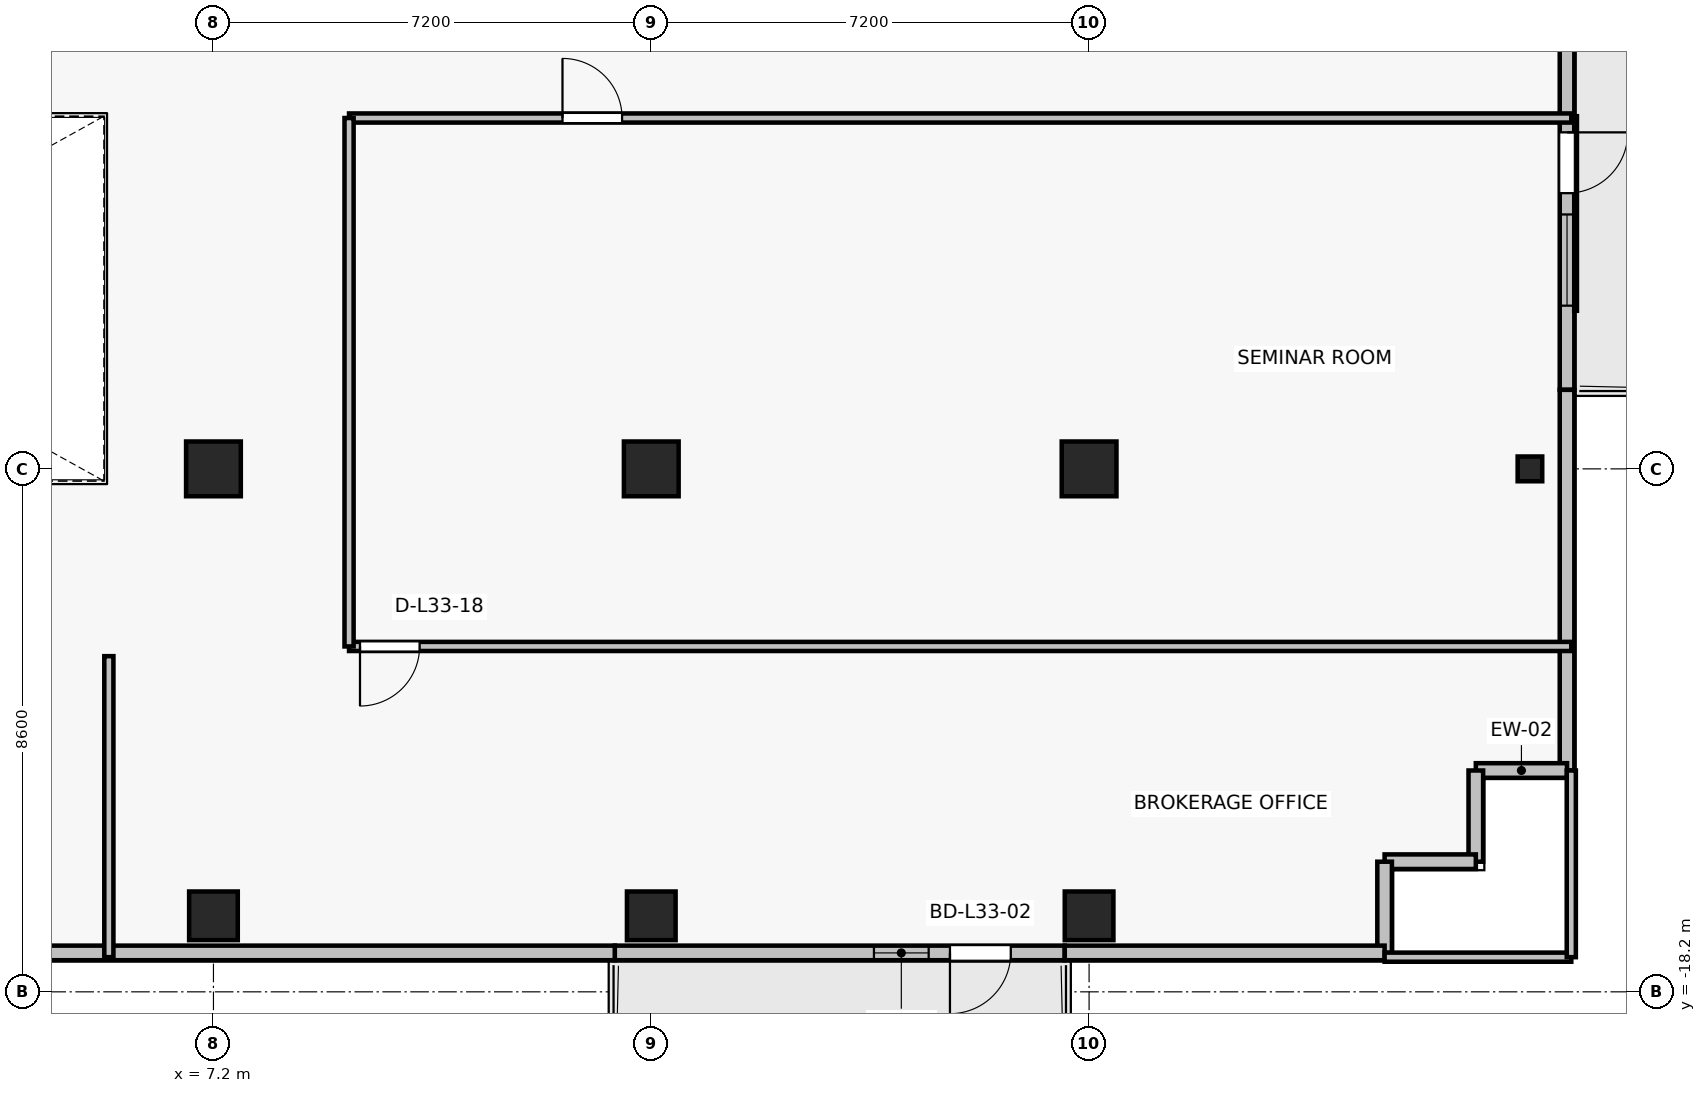
"""IFC4 building model, lengths in metres.
Left out: names, types, materials, properties, quantities, classifications, styles, units other than length and angle.
Written with IfcOpenShell. Run it as: python <this file> out.ifc"""

import sys

from ifc_helpers import new_model, si_unit, direction, frame, frame_2d, origin, origin_2d, place, context, subcontext, project, spatial, rectangle, i_section, extrude, source, transform, mapped, element, fill, save


model = new_model("IFC4")
c1 = context("Model", 3, precision=1e-05, world=origin(), true_north=direction((0.0, 1.0)))
c2 = subcontext(c1, "Body", "Model", "MODEL_VIEW")
j1 = project(units=[si_unit("LENGTHUNIT", "METRE"), si_unit("PLANEANGLEUNIT", "RADIAN")], contexts=[c1])
p1 = place(None, origin())
s1 = spatial("IfcSite", under=j1, at=p1, CompositionType="ELEMENT")
p2 = place(p1, origin())
s2 = spatial("IfcBuilding", under=s1, at=p2, CompositionType="ELEMENT")
p3 = place(p2, frame((0.0, 0.0, 119.8)))
s3 = spatial("IfcBuildingStorey", under=s2, at=p3, CompositionType="ELEMENT", Elevation=119.8)
for number, where, z_axis, x_axis in (
    (1, (7.2, -9.6, 0.0), (0.0, 0.0, 1.0), (1.0, 0.0, 0.0)),
    (2, (14.4, -9.6, 0.0), (0.0, 0.0, 1.0), (1.0, 0.0, 0.0)),
    (3, (21.6, -9.6, 0.0), (0.0, 0.0, 1.0), (1.0, 0.0, 0.0)),
):
    element("IfcColumn", number, at=place(p3, frame(where, z_axis=z_axis, x_axis=x_axis)), inside=s3, PredefinedType="COLUMN", context=c2, shape_type="SweptSolid", body=[
        extrude(rectangle(XDim=0.9, YDim=0.9, at=origin_2d()), origin(), (0.0, 0.0, 1.0), 3.3),
    ])
for number, where, z_axis, x_axis in (
    (4, (7.2, -16.95, 0.0), (0.0, 0.0, 1.0), (1.0, 0.0, 0.0)),
    (5, (14.4, -16.95, 0.0), (0.0, 0.0, 1.0), (1.0, 0.0, 0.0)),
    (6, (21.6, -16.95, 0.0), (0.0, 0.0, 1.0), (1.0, 0.0, 0.0)),
):
    element("IfcColumn", number, at=place(p3, frame(where, z_axis=z_axis, x_axis=x_axis)), inside=s3, PredefinedType="COLUMN", context=c2, shape_type="SweptSolid", body=[
        extrude(rectangle(XDim=0.8, YDim=0.8, at=origin_2d()), origin(), (0.0, 0.0, 1.0), 3.3),
    ])
p4 = place(p3, frame((28.85, -9.6, 0.0), z_axis=(0.0, 0.0, 1.0), x_axis=(1.0, 0.0, 0.0)))
e7 = element("IfcColumn", 7, at=p4, inside=s3, PredefinedType="COLUMN", context=c2, shape_type="SweptSolid", body=[
    extrude(i_section(OverallWidth=0.404, OverallDepth=0.407, WebThickness=0.022, FlangeThickness=0.032, FilletRadius=0.015, at=origin_2d()), origin(), (0.0, 0.0, 1.0), 3.3),
])
p5 = place(p3, frame((21.2, -17.56, 0.0), z_axis=(0.0, 0.0, 1.0), x_axis=(-1.0, 0.0, 0.0)))
e8 = element("IfcWall", 8, at=p5, inside=s3, PredefinedType="SOLIDWALL", context=c2, shape_type="SweptSolid", body=[
    extrude(rectangle(XDim=7.4, YDim=0.24, at=frame_2d((3.7, 0.0))), origin(), (0.0, 0.0, 1.0), 2.665),
])
p6 = place(p5, frame((0.888, 0.0, 0.0)))
e9 = element("IfcOpeningElement", 9, at=p6, cuts=e8, PredefinedType="OPENING", context=c2, shape_type="SweptSolid", body=[
    extrude(rectangle(XDim=1.0, YDim=2.2, at=frame_2d((0.5, 1.1))), frame((0.0, 0.13, 0.0), z_axis=(0.0, -1.0, 0.0), x_axis=(1.0, 0.0, 0.0)), (0.0, 0.0, 1.0), 0.26),
])
p7 = place(p5, frame((2.238, 0.0, 0.85)))
e10 = element("IfcOpeningElement", 10, at=p7, cuts=e8, PredefinedType="OPENING", context=c2, shape_type="SweptSolid", body=[
    extrude(rectangle(XDim=0.9, YDim=1.35, at=frame_2d((0.45, 0.675))), frame((0.0, 0.13, 0.0), z_axis=(0.0, -1.0, 0.0), x_axis=(1.0, 0.0, 0.0)), (0.0, 0.0, 1.0), 0.26),
])
p8 = place(p3, frame((29.46, -2.5, 0.0), z_axis=(0.0, 0.0, 1.0), x_axis=(0.0, -1.0, 0.0)))
e11 = element("IfcWall", 11, at=p8, inside=s3, PredefinedType="SOLIDWALL", context=c2, shape_type="SweptSolid", body=[
    extrude(rectangle(XDim=5.8, YDim=0.24, at=frame_2d((2.9, 0.0))), origin(), (0.0, 0.0, 1.0), 3.075),
])
p9 = place(p8, frame((1.566, 0.0, 0.0)))
e12 = element("IfcOpeningElement", 12, at=p9, cuts=e11, PredefinedType="OPENING", context=c2, shape_type="SweptSolid", body=[
    extrude(rectangle(XDim=1.0, YDim=2.2, at=frame_2d((0.5, 1.1))), frame((0.0, 0.13, 0.0), z_axis=(0.0, -1.0, 0.0), x_axis=(1.0, 0.0, 0.0)), (0.0, 0.0, 1.0), 0.26),
])
p10 = place(p8, frame((2.916, 0.0, 0.85)))
e13 = element("IfcOpeningElement", 13, at=p10, cuts=e11, PredefinedType="OPENING", context=c2, shape_type="SweptSolid", body=[
    extrude(rectangle(XDim=1.5, YDim=1.6, at=frame_2d((0.75, 0.8))), frame((0.0, 0.13, 0.0), z_axis=(0.0, -1.0, 0.0), x_axis=(1.0, 0.0, 0.0)), (0.0, 0.0, 1.0), 0.26),
])
p11 = place(p3, frame((29.46, -14.56, 0.0), z_axis=(0.0, 0.0, 1.0), x_axis=(0.0, 1.0, 0.0)))
e14 = element("IfcWall", 14, at=p11, inside=s3, PredefinedType="SOLIDWALL", context=c2, shape_type="SweptSolid", body=[
    extrude(rectangle(XDim=6.26, YDim=0.24, at=frame_2d((3.13, 0.0))), origin(), (0.0, 0.0, 1.0), 3.075),
])
for number, where, z_axis, x_axis in (
    (15, (27.96, -14.56, 0.0), (0.0, 0.0, 1.0), (1.0, 0.0, 0.0)),
    (16, (27.96, -16.06, 0.0), (0.0, 0.0, 1.0), (0.0, 1.0, 0.0)),
    (17, (26.46, -16.06, 0.0), (0.0, 0.0, 1.0), (1.0, 0.0, 0.0)),
    (18, (26.46, -17.56, 0.0), (0.0, 0.0, 1.0), (0.0, 1.0, 0.0)),
):
    element("IfcWall", number, at=place(p3, frame(where, z_axis=z_axis, x_axis=x_axis)), inside=s3, PredefinedType="SOLIDWALL", context=c2, shape_type="SweptSolid", body=[
        extrude(rectangle(XDim=1.5, YDim=0.24, at=frame_2d((0.75, 0.0))), origin(), (0.0, 0.0, 1.0), 3.075),
    ])
p12 = place(p3, frame((21.2, -17.56, 0.0), z_axis=(0.0, 0.0, 1.0), x_axis=(1.0, 0.0, 0.0)))
e19 = element("IfcWall", 19, at=p12, inside=s3, PredefinedType="SOLIDWALL", context=c2, shape_type="SweptSolid", body=[
    extrude(rectangle(XDim=5.26, YDim=0.24, at=frame_2d((2.63, 0.0))), origin(), (0.0, 0.0, 1.0), 3.075),
])
p13 = place(p3, frame((3.34, -17.56, 0.0), z_axis=(0.0, 0.0, 1.0), x_axis=(1.0, 0.0, 0.0)))
e20 = element("IfcWall", 20, at=p13, inside=s3, PredefinedType="SOLIDWALL", context=c2, shape_type="SweptSolid", body=[
    extrude(rectangle(XDim=10.46, YDim=0.24, at=frame_2d((5.23, 0.0))), origin(), (0.0, 0.0, 1.0), 2.665),
])
p14 = place(p3, frame((29.53, -12.52, 0.0), z_axis=(0.0, 0.0, 1.0), x_axis=(-1.0, 0.0, 0.0)))
e21 = element("IfcWall", 21, at=p14, inside=s3, PredefinedType="PARTITIONING", context=c2, shape_type="SweptSolid", body=[
    extrude(rectangle(XDim=20.1, YDim=0.15, at=frame_2d((10.05, 0.0))), origin(), (0.0, 0.0, 1.0), 2.515),
])
p15 = place(p14, frame((18.94, 0.0, 0.0)))
e22 = element("IfcOpeningElement", 22, at=p15, cuts=e21, PredefinedType="OPENING", context=c2, shape_type="SweptSolid", body=[
    extrude(rectangle(XDim=0.98, YDim=2.15, at=frame_2d((0.49, 1.075))), frame((0.0, 0.085, 0.0), z_axis=(0.0, -1.0, 0.0), x_axis=(1.0, 0.0, 0.0)), (0.0, 0.0, 1.0), 0.17),
])
p16 = place(p3, frame((9.43, -3.83, 0.0), z_axis=(0.0, 0.0, 1.0), x_axis=(1.0, 0.0, 0.0)))
e23 = element("IfcWall", 23, at=p16, inside=s3, PredefinedType="PARTITIONING", context=c2, shape_type="SweptSolid", body=[
    extrude(rectangle(XDim=20.1, YDim=0.15, at=frame_2d((10.05, 0.0))), origin(), (0.0, 0.0, 1.0), 2.515),
])
p17 = place(p16, frame((3.51, 0.0, 0.0)))
e24 = element("IfcOpeningElement", 24, at=p17, cuts=e23, PredefinedType="OPENING", context=c2, shape_type="SweptSolid", body=[
    extrude(rectangle(XDim=0.98, YDim=2.15, at=frame_2d((0.49, 1.075))), frame((0.0, 0.085, 0.0), z_axis=(0.0, -1.0, 0.0), x_axis=(1.0, 0.0, 0.0)), (0.0, 0.0, 1.0), 0.17),
])
p18 = place(p3, frame((9.43, -12.52, 0.0), z_axis=(0.0, 0.0, 1.0), x_axis=(0.0, 1.0, 0.0)))
e25 = element("IfcWall", 25, at=p18, inside=s3, PredefinedType="PARTITIONING", context=c2, shape_type="SweptSolid", body=[
    extrude(rectangle(XDim=8.69, YDim=0.15, at=frame_2d((4.345, 0.0))), origin(), (0.0, 0.0, 1.0), 2.515),
])
p19 = place(p3, frame((29.53, -17.63, 0.0), z_axis=(0.0, 0.0, 1.0), x_axis=(-1.0, 0.0, 0.0)))
e26 = element("IfcWall", 26, at=p19, inside=s3, PredefinedType="PARTITIONING", context=c2, shape_type="SweptSolid", body=[
    extrude(rectangle(XDim=3.07, YDim=0.15, at=frame_2d((1.535, 0.0))), origin(), (0.0, 0.0, 1.0), 2.665),
])
p20 = place(p3, frame((5.48, -17.63, 0.0), z_axis=(0.0, 0.0, 1.0), x_axis=(0.0, 1.0, 0.0)))
e27 = element("IfcWall", 27, at=p20, inside=s3, PredefinedType="PARTITIONING", context=c2, shape_type="SweptSolid", body=[
    extrude(rectangle(XDim=4.95, YDim=0.15, at=frame_2d((2.475, 0.0))), origin(), (0.0, 0.0, 1.0), 2.565),
])
p21 = place(p3, frame((29.53, -14.56, 0.0), z_axis=(0.0, 0.0, 1.0), x_axis=(0.0, -1.0, 0.0)))
e28 = element("IfcWall", 28, at=p21, inside=s3, PredefinedType="PARTITIONING", context=c2, shape_type="SweptSolid", body=[
    extrude(rectangle(XDim=3.07, YDim=0.15, at=frame_2d((1.535, 0.0))), origin(), (0.0, 0.0, 1.0), 3.075),
])
m1 = source(origin(), c2, "Body", "SweptSolid", [
    extrude(rectangle(XDim=1.0, YDim=2.2, at=frame_2d((0.5, 1.1))), frame((0.0, 0.025, 0.0), z_axis=(0.0, -1.0, 0.0), x_axis=(1.0, 0.0, 0.0)), (0.0, 0.0, 1.0), 0.05),
])
p22 = place(p6, origin())
e29 = element("IfcDoor", 29, at=p22, inside=s3, OperationType="SINGLE_SWING_RIGHT", PredefinedType="DOOR", context=c2, shape_type="MappedRepresentation", body=[
    mapped(m1, transform((0.0, 0.0, 0.0), x_axis=(1.0, 0.0, 0.0), y_axis=(0.0, 1.0, 0.0), z_axis=(0.0, 0.0, 1.0), scale=1.0)),
])
fill(e9, e29)
m2 = source(origin(), c2, "Body", "SweptSolid", [
    extrude(rectangle(XDim=0.9, YDim=1.35, at=frame_2d((0.45, 0.675))), frame((0.0, 0.03, 0.0), z_axis=(0.0, -1.0, 0.0), x_axis=(1.0, 0.0, 0.0)), (0.0, 0.0, 1.0), 0.06),
])
p23 = place(p7, origin())
e30 = element("IfcWindow", 30, at=p23, inside=s3, PartitioningType="SINGLE_PANEL", PredefinedType="WINDOW", context=c2, shape_type="MappedRepresentation", body=[
    mapped(m2, transform((0.0, 0.0, 0.0), x_axis=(1.0, 0.0, 0.0), y_axis=(0.0, 1.0, 0.0), z_axis=(0.0, 0.0, 1.0), scale=1.0)),
])
fill(e10, e30)
p24 = place(p9, origin())
e31 = element("IfcDoor", 31, at=p24, inside=s3, OperationType="SINGLE_SWING_LEFT", PredefinedType="DOOR", context=c2, shape_type="MappedRepresentation", body=[
    mapped(m1, transform((0.0, 0.0, 0.0), x_axis=(1.0, 0.0, 0.0), y_axis=(0.0, 1.0, 0.0), z_axis=(0.0, 0.0, 1.0), scale=1.0)),
])
fill(e12, e31)
m3 = source(origin(), c2, "Body", "SweptSolid", [
    extrude(rectangle(XDim=1.5, YDim=1.6, at=frame_2d((0.75, 0.8))), frame((0.0, 0.03, 0.0), z_axis=(0.0, -1.0, 0.0), x_axis=(1.0, 0.0, 0.0)), (0.0, 0.0, 1.0), 0.06),
])
p25 = place(p10, origin())
e32 = element("IfcWindow", 32, at=p25, inside=s3, PartitioningType="SINGLE_PANEL", PredefinedType="WINDOW", context=c2, shape_type="MappedRepresentation", body=[
    mapped(m3, transform((0.0, 0.0, 0.0), x_axis=(1.0, 0.0, 0.0), y_axis=(0.0, 1.0, 0.0), z_axis=(0.0, 0.0, 1.0), scale=1.0)),
])
fill(e13, e32)
m4 = source(origin(), c2, "Body", "SweptSolid", [
    extrude(rectangle(XDim=0.98, YDim=2.15, at=frame_2d((0.49, 1.075))), frame((0.0, 0.025, 0.0), z_axis=(0.0, -1.0, 0.0), x_axis=(1.0, 0.0, 0.0)), (0.0, 0.0, 1.0), 0.05),
])
p26 = place(p17, origin())
e33 = element("IfcDoor", 33, at=p26, inside=s3, OperationType="SINGLE_SWING_LEFT", PredefinedType="DOOR", context=c2, shape_type="MappedRepresentation", body=[
    mapped(m4, transform((0.0, 0.0, 0.0), x_axis=(1.0, 0.0, 0.0), y_axis=(0.0, 1.0, 0.0), z_axis=(0.0, 0.0, 1.0), scale=1.0)),
])
fill(e24, e33)
p27 = place(p15, origin())
e34 = element("IfcDoor", 34, at=p27, inside=s3, OperationType="SINGLE_SWING_RIGHT", PredefinedType="DOOR", context=c2, shape_type="MappedRepresentation", body=[
    mapped(m4, transform((0.0, 0.0, 0.0), x_axis=(1.0, 0.0, 0.0), y_axis=(0.0, 1.0, 0.0), z_axis=(0.0, 0.0, 1.0), scale=1.0)),
])
fill(e22, e34)
save(model, sys.argv[1])
